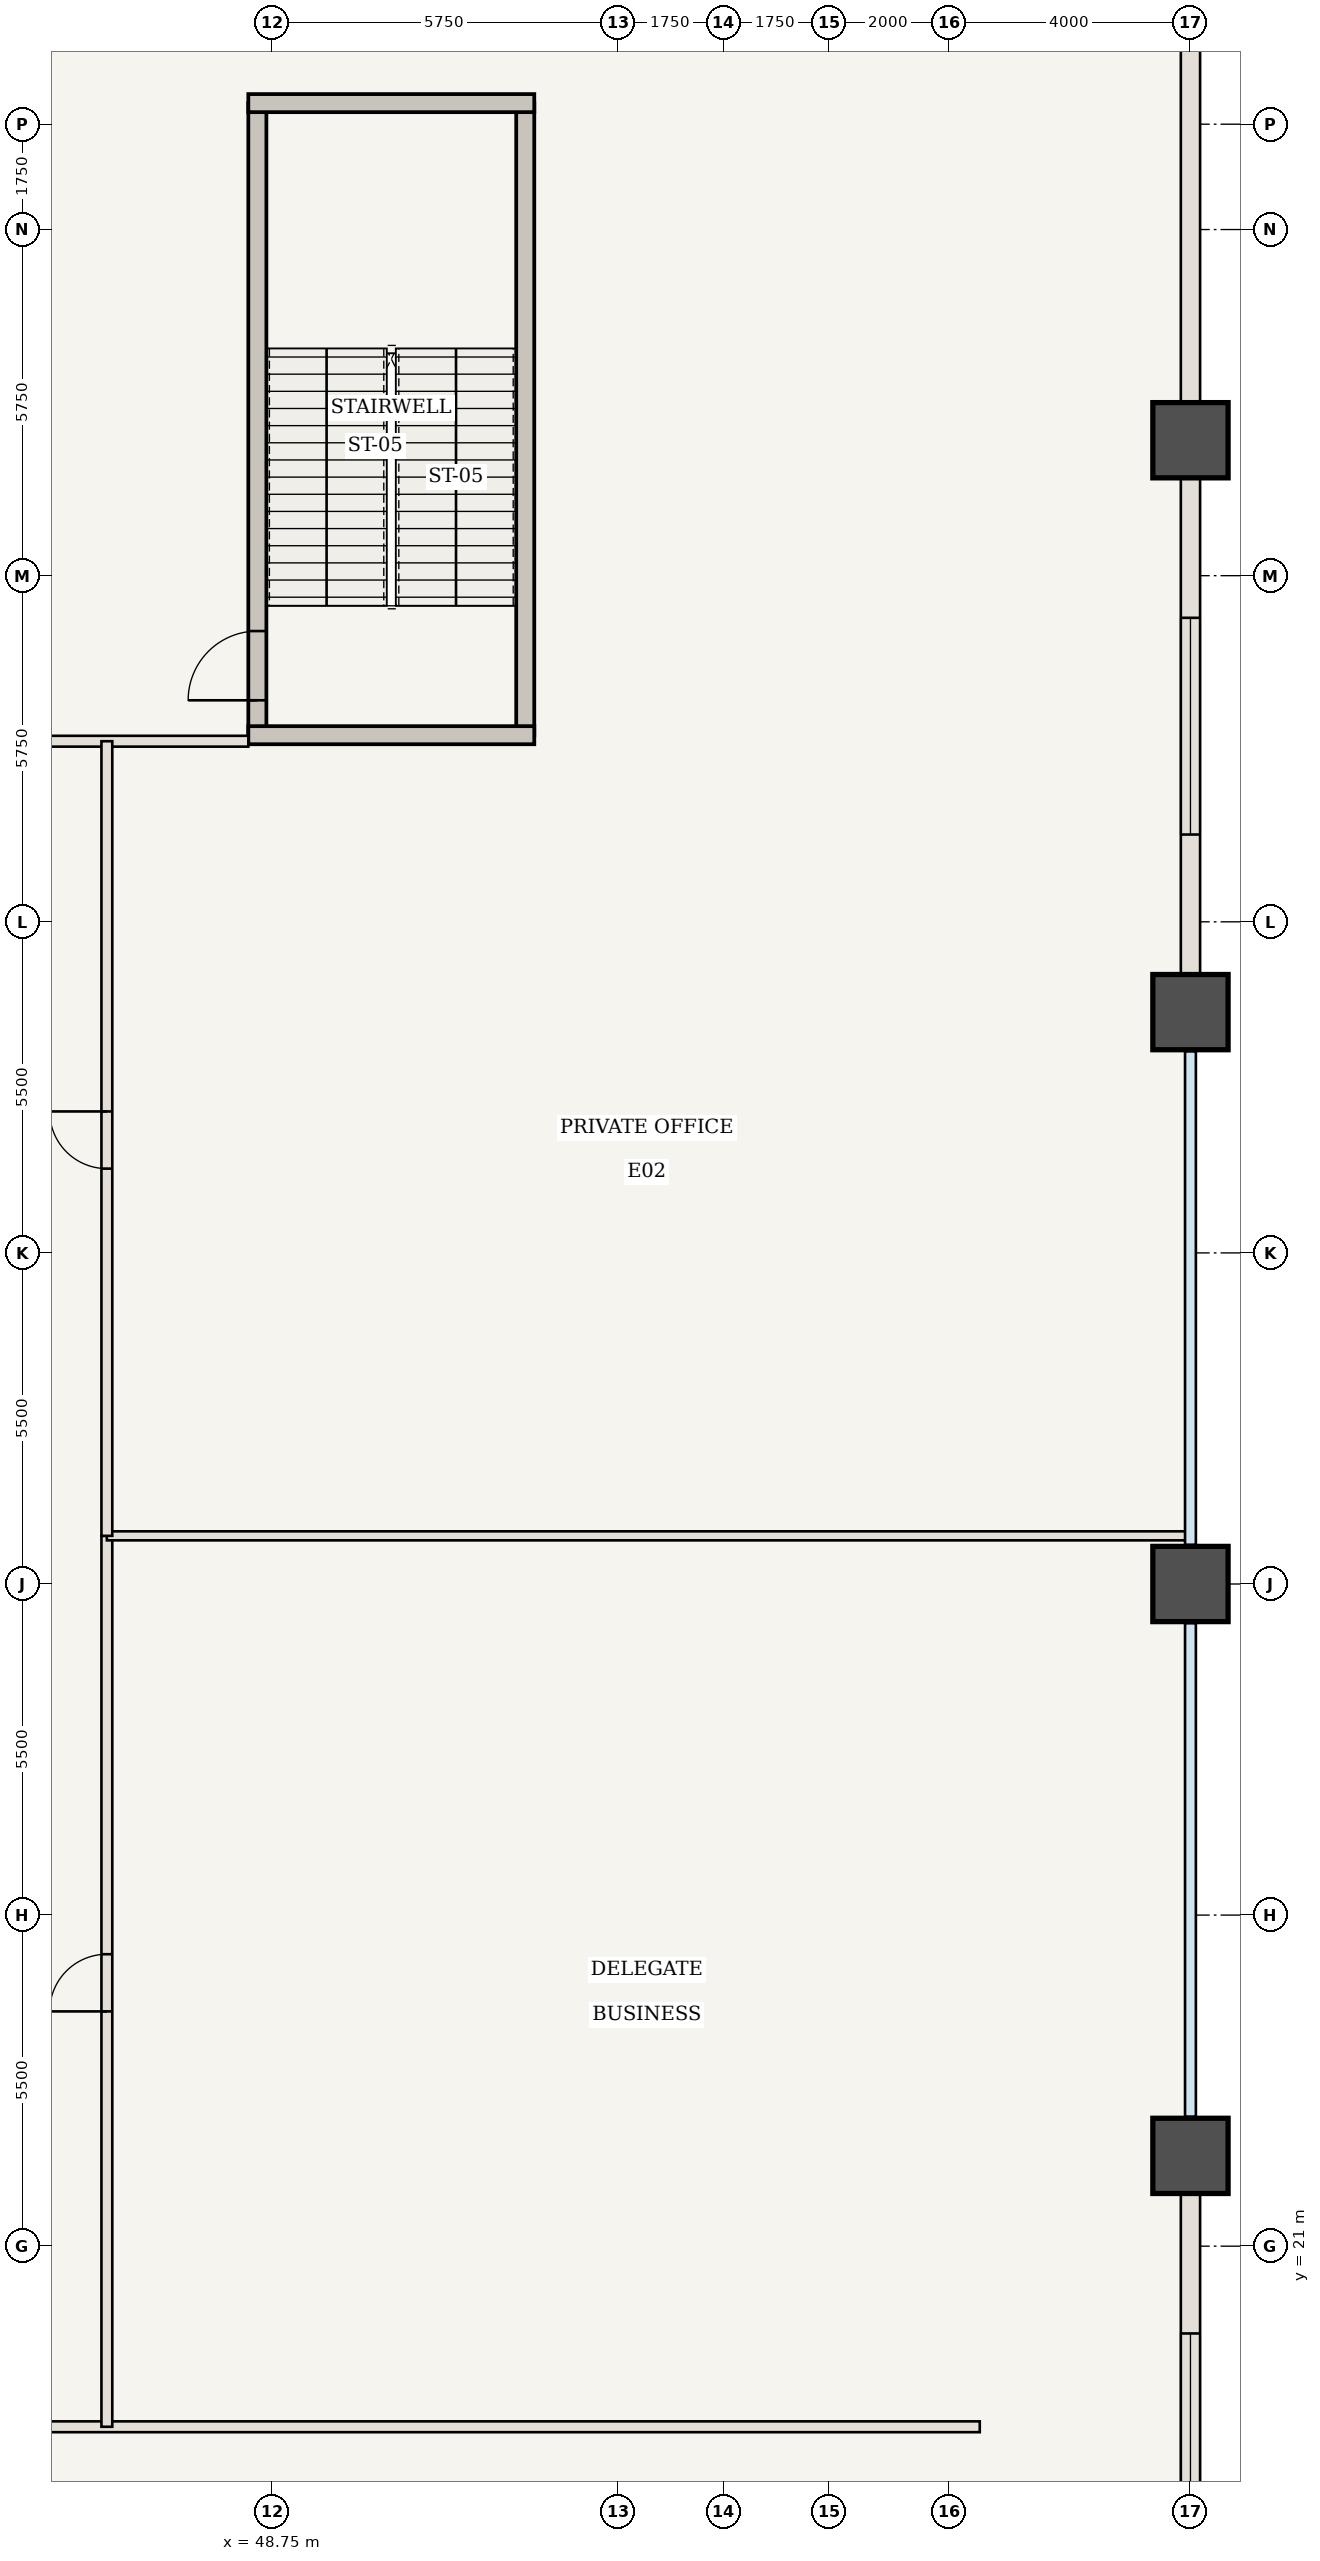
"""IFC4 building model, lengths in metres.
Left out: names, types, materials, properties, quantities, classifications, styles, units other than length and angle.
Written with IfcOpenShell. Run it as: python <this file> out.ifc"""

import sys

from ifc_helpers import new_model, si_unit, direction, frame, frame_2d, origin, origin_2d, place, context, subcontext, project, spatial, rectangle, extrude, element, fill, save


model = new_model("IFC4")
c1 = context("Model", 3, precision=1e-05, world=origin(), true_north=direction((0.0, 1.0)))
c2 = subcontext(c1, "Body", "Model", "MODEL_VIEW")
j1 = project(units=[si_unit("LENGTHUNIT", "METRE"), si_unit("PLANEANGLEUNIT", "RADIAN")], contexts=[c1])
p1 = place(None, origin())
s1 = spatial("IfcSite", under=j1, at=p1, CompositionType="ELEMENT")
p2 = place(p1, origin())
s2 = spatial("IfcBuilding", under=s1, at=p2, CompositionType="ELEMENT")
p3 = place(p2, frame((0.0, 0.0, 6.65)))
s3 = spatial("IfcBuildingStorey", under=s2, at=p3, CompositionType="ELEMENT", Elevation=6.65)
for number, where, z_axis, x_axis in (
    (1, (64.0, 22.5, 0.0), (0.0, 0.0, 1.0), (1.0, 0.0, 0.0)),
    (2, (64.0, 32.0, 0.0), (0.0, 0.0, 1.0), (1.0, 0.0, 0.0)),
    (3, (64.0, 41.5, 0.0), (0.0, 0.0, 1.0), (1.0, 0.0, 0.0)),
    (4, (64.0, 51.0, 0.0), (0.0, 0.0, 1.0), (1.0, 0.0, 0.0)),
):
    element("IfcColumn", number, at=place(p3, frame(where, z_axis=z_axis, x_axis=x_axis)), inside=s3, PredefinedType="COLUMN", context=c2, shape_type="SweptSolid", body=[
        extrude(rectangle(XDim=1.25, YDim=1.25, at=origin_2d()), origin(), (0.0, 0.0, 1.0), 5.6),
    ])
p4 = place(p3, frame((48.5, 46.1, 0.0), z_axis=(0.0, 0.0, 1.0), x_axis=(0.0, 1.0, 0.0)))
e5 = element("IfcWall", 5, at=p4, inside=s3, PredefinedType="SHEAR", context=c2, shape_type="SweptSolid", body=[
    extrude(rectangle(XDim=10.5, YDim=0.3, at=frame_2d((5.25, 0.0))), origin(), (0.0, 0.0, 1.0), 5.36),
])
p5 = place(p4, frame((0.58, 0.0, 0.0)))
e6 = element("IfcOpeningElement", 6, at=p5, cuts=e5, PredefinedType="OPENING", context=c2, shape_type="SweptSolid", body=[
    extrude(rectangle(XDim=1.15, YDim=2.15, at=frame_2d((0.575, 1.075))), frame((0.0, 0.16, 0.0), z_axis=(0.0, -1.0, 0.0), x_axis=(1.0, 0.0, 0.0)), (0.0, 0.0, 1.0), 0.32),
])
p6 = place(p3, frame((52.95, 46.1, 0.0), z_axis=(0.0, 0.0, 1.0), x_axis=(0.0, 1.0, 0.0)))
e7 = element("IfcWall", 7, at=p6, inside=s3, PredefinedType="SHEAR", context=c2, shape_type="SweptSolid", body=[
    extrude(rectangle(XDim=10.5, YDim=0.3, at=frame_2d((5.25, 0.0))), origin(), (0.0, 0.0, 1.0), 5.36),
])
for number, where, z_axis, x_axis in (
    (8, (48.35, 46.1, 0.0), (0.0, 0.0, 1.0), (1.0, 0.0, 0.0)),
    (9, (48.35, 56.6, 0.0), (0.0, 0.0, 1.0), (1.0, 0.0, 0.0)),
):
    element("IfcWall", number, at=place(p3, frame(where, z_axis=z_axis, x_axis=x_axis)), inside=s3, PredefinedType="SHEAR", context=c2, shape_type="SweptSolid", body=[
        extrude(rectangle(XDim=4.75, YDim=0.3, at=frame_2d((2.375, 0.0))), origin(), (0.0, 0.0, 1.0), 5.36),
    ])
p7 = place(p3, frame((38.0, 18.0, 0.0), z_axis=(0.0, 0.0, 1.0), x_axis=(1.0, 0.0, 0.0)))
e10 = element("IfcWall", 10, at=p7, inside=s3, PredefinedType="STANDARD", context=c2, shape_type="SweptSolid", body=[
    extrude(rectangle(XDim=22.5, YDim=0.18, at=frame_2d((11.25, 0.0))), origin(), (0.0, 0.0, 1.0), 5.36),
])
p8 = place(p7, frame((4.925, 0.0, 0.0)))
e11 = element("IfcOpeningElement", 11, at=p8, cuts=e10, PredefinedType="OPENING", context=c2, shape_type="SweptSolid", body=[
    extrude(rectangle(XDim=1.8, YDim=2.35, at=frame_2d((0.9, 1.175))), frame((0.0, 0.1, 0.0), z_axis=(0.0, -1.0, 0.0), x_axis=(1.0, 0.0, 0.0)), (0.0, 0.0, 1.0), 0.2),
])
p9 = place(p3, frame((35.5, 46.0, 0.0), z_axis=(0.0, 0.0, 1.0), x_axis=(1.0, 0.0, 0.0)))
e12 = element("IfcWall", 12, at=p9, inside=s3, PredefinedType="STANDARD", context=c2, shape_type="SweptSolid", body=[
    extrude(rectangle(XDim=12.85, YDim=0.18, at=frame_2d((6.425, 0.0))), origin(), (0.0, 0.0, 1.0), 5.36),
])
p10 = place(p9, frame((4.725, 0.0, 0.0)))
e13 = element("IfcOpeningElement", 13, at=p10, cuts=e12, PredefinedType="OPENING", context=c2, shape_type="SweptSolid", body=[
    extrude(rectangle(XDim=1.8, YDim=2.35, at=frame_2d((0.9, 1.175))), frame((0.0, 0.1, 0.0), z_axis=(0.0, -1.0, 0.0), x_axis=(1.0, 0.0, 0.0)), (0.0, 0.0, 1.0), 0.2),
])
p11 = place(p3, frame((46.0, 18.0, 0.0), z_axis=(0.0, 0.0, 1.0), x_axis=(0.0, 1.0, 0.0)))
e14 = element("IfcWall", 14, at=p11, inside=s3, PredefinedType="STANDARD", context=c2, shape_type="SweptSolid", body=[
    extrude(rectangle(XDim=14.8, YDim=0.18, at=frame_2d((7.4, 0.0))), origin(), (0.0, 0.0, 1.0), 5.36),
])
p12 = place(p11, frame((6.9, 0.0, 0.0)))
e15 = element("IfcOpeningElement", 15, at=p12, cuts=e14, PredefinedType="OPENING", context=c2, shape_type="SweptSolid", body=[
    extrude(rectangle(XDim=0.95, YDim=2.15, at=frame_2d((0.475, 1.075))), frame((0.0, 0.1, 0.0), z_axis=(0.0, -1.0, 0.0), x_axis=(1.0, 0.0, 0.0)), (0.0, 0.0, 1.0), 0.2),
])
p13 = place(p3, frame((46.0, 32.8, 0.0), z_axis=(0.0, 0.0, 1.0), x_axis=(1.0, 0.0, 0.0)))
e16 = element("IfcWall", 16, at=p13, inside=s3, PredefinedType="STANDARD", context=c2, shape_type="SweptSolid", body=[
    extrude(rectangle(XDim=17.94, YDim=0.15, at=frame_2d((8.97, 0.0))), origin(), (0.0, 0.0, 1.0), 5.36),
])
p14 = place(p3, frame((46.0, 32.8, 0.0), z_axis=(0.0, 0.0, 1.0), x_axis=(0.0, 1.0, 0.0)))
e17 = element("IfcWall", 17, at=p14, inside=s3, PredefinedType="STANDARD", context=c2, shape_type="SweptSolid", body=[
    extrude(rectangle(XDim=13.2, YDim=0.18, at=frame_2d((6.6, 0.0))), origin(), (0.0, 0.0, 1.0), 5.36),
])
p15 = place(p14, frame((6.1, 0.0, 0.0)))
e18 = element("IfcOpeningElement", 18, at=p15, cuts=e17, PredefinedType="OPENING", context=c2, shape_type="SweptSolid", body=[
    extrude(rectangle(XDim=0.95, YDim=2.15, at=frame_2d((0.475, 1.075))), frame((0.0, 0.1, 0.0), z_axis=(0.0, -1.0, 0.0), x_axis=(1.0, 0.0, 0.0)), (0.0, 0.0, 1.0), 0.2),
])
p16 = place(p3, frame((64.0, 22.5, 0.0), z_axis=(0.0, 0.0, 1.0), x_axis=(0.0, -1.0, 0.0)))
e19 = element("IfcWall", 19, at=p16, inside=s3, PredefinedType="USERDEFINED", context=c2, shape_type="SweptSolid", body=[
    extrude(rectangle(XDim=9.5, YDim=0.32, at=frame_2d((4.75, 0.0))), origin(), (0.0, 0.0, 1.0), 4.46),
])
p17 = place(p16, frame((2.95, 0.0, 0.85)))
e20 = element("IfcOpeningElement", 20, at=p17, cuts=e19, PredefinedType="OPENING", context=c2, shape_type="SweptSolid", body=[
    extrude(rectangle(XDim=3.6, YDim=2.6, at=frame_2d((1.8, 1.3))), frame((0.0, 0.17, 0.0), z_axis=(0.0, -1.0, 0.0), x_axis=(1.0, 0.0, 0.0)), (0.0, 0.0, 1.0), 0.34),
])
p18 = place(p3, frame((64.0, 51.0, 0.0), z_axis=(0.0, 0.0, 1.0), x_axis=(0.0, -1.0, 0.0)))
e21 = element("IfcWall", 21, at=p18, inside=s3, PredefinedType="USERDEFINED", context=c2, shape_type="SweptSolid", body=[
    extrude(rectangle(XDim=9.5, YDim=0.32, at=frame_2d((4.75, 0.0))), origin(), (0.0, 0.0, 1.0), 4.46),
])
p19 = place(p18, frame((2.95, 0.0, 0.85)))
e22 = element("IfcOpeningElement", 22, at=p19, cuts=e21, PredefinedType="OPENING", context=c2, shape_type="SweptSolid", body=[
    extrude(rectangle(XDim=3.6, YDim=2.6, at=frame_2d((1.8, 1.3))), frame((0.0, 0.17, 0.0), z_axis=(0.0, -1.0, 0.0), x_axis=(1.0, 0.0, 0.0)), (0.0, 0.0, 1.0), 0.34),
])
p20 = place(p3, frame((64.0, 60.5, 0.0), z_axis=(0.0, 0.0, 1.0), x_axis=(0.0, -1.0, 0.0)))
e23 = element("IfcWall", 23, at=p20, inside=s3, PredefinedType="USERDEFINED", context=c2, shape_type="SweptSolid", body=[
    extrude(rectangle(XDim=9.5, YDim=0.32, at=frame_2d((4.75, 0.0))), origin(), (0.0, 0.0, 1.0), 4.46),
])
p21 = place(p5, origin())
e24 = element("IfcDoor", 24, at=p21, inside=s3, OperationType="SINGLE_SWING_LEFT", PredefinedType="DOOR", context=c2, shape_type="SweptSolid", body=[
    extrude(rectangle(XDim=1.15, YDim=2.15, at=frame_2d((0.575, 1.075))), frame((0.0, 0.025, 0.0), z_axis=(0.0, -1.0, 0.0), x_axis=(1.0, 0.0, 0.0)), (0.0, 0.0, 1.0), 0.05),
])
fill(e6, e24)
p22 = place(p12, origin())
e25 = element("IfcDoor", 25, at=p22, inside=s3, OperationType="SINGLE_SWING_LEFT", PredefinedType="DOOR", context=c2, shape_type="SweptSolid", body=[
    extrude(rectangle(XDim=0.95, YDim=2.15, at=frame_2d((0.475, 1.075))), frame((0.0, 0.025, 0.0), z_axis=(0.0, -1.0, 0.0), x_axis=(1.0, 0.0, 0.0)), (0.0, 0.0, 1.0), 0.05),
])
fill(e15, e25)
p23 = place(p15, origin())
e26 = element("IfcDoor", 26, at=p23, inside=s3, OperationType="SINGLE_SWING_RIGHT", PredefinedType="DOOR", context=c2, shape_type="SweptSolid", body=[
    extrude(rectangle(XDim=0.95, YDim=2.15, at=frame_2d((0.475, 1.075))), frame((0.0, 0.025, 0.0), z_axis=(0.0, -1.0, 0.0), x_axis=(1.0, 0.0, 0.0)), (0.0, 0.0, 1.0), 0.05),
])
fill(e18, e26)
p24 = place(p17, origin())
e27 = element("IfcWindow", 27, at=p24, inside=s3, PartitioningType="SINGLE_PANEL", PredefinedType="WINDOW", context=c2, shape_type="SweptSolid", body=[
    extrude(rectangle(XDim=3.6, YDim=2.6, at=frame_2d((1.8, 1.3))), frame((0.0, 0.03, 0.0), z_axis=(0.0, -1.0, 0.0), x_axis=(1.0, 0.0, 0.0)), (0.0, 0.0, 1.0), 0.06),
])
fill(e20, e27)
p25 = place(p19, origin())
e28 = element("IfcWindow", 28, at=p25, inside=s3, PartitioningType="SINGLE_PANEL", PredefinedType="WINDOW", context=c2, shape_type="SweptSolid", body=[
    extrude(rectangle(XDim=3.6, YDim=2.6, at=frame_2d((1.8, 1.3))), frame((0.0, 0.03, 0.0), z_axis=(0.0, -1.0, 0.0), x_axis=(1.0, 0.0, 0.0)), (0.0, 0.0, 1.0), 0.06),
])
fill(e22, e28)
save(model, sys.argv[1])
